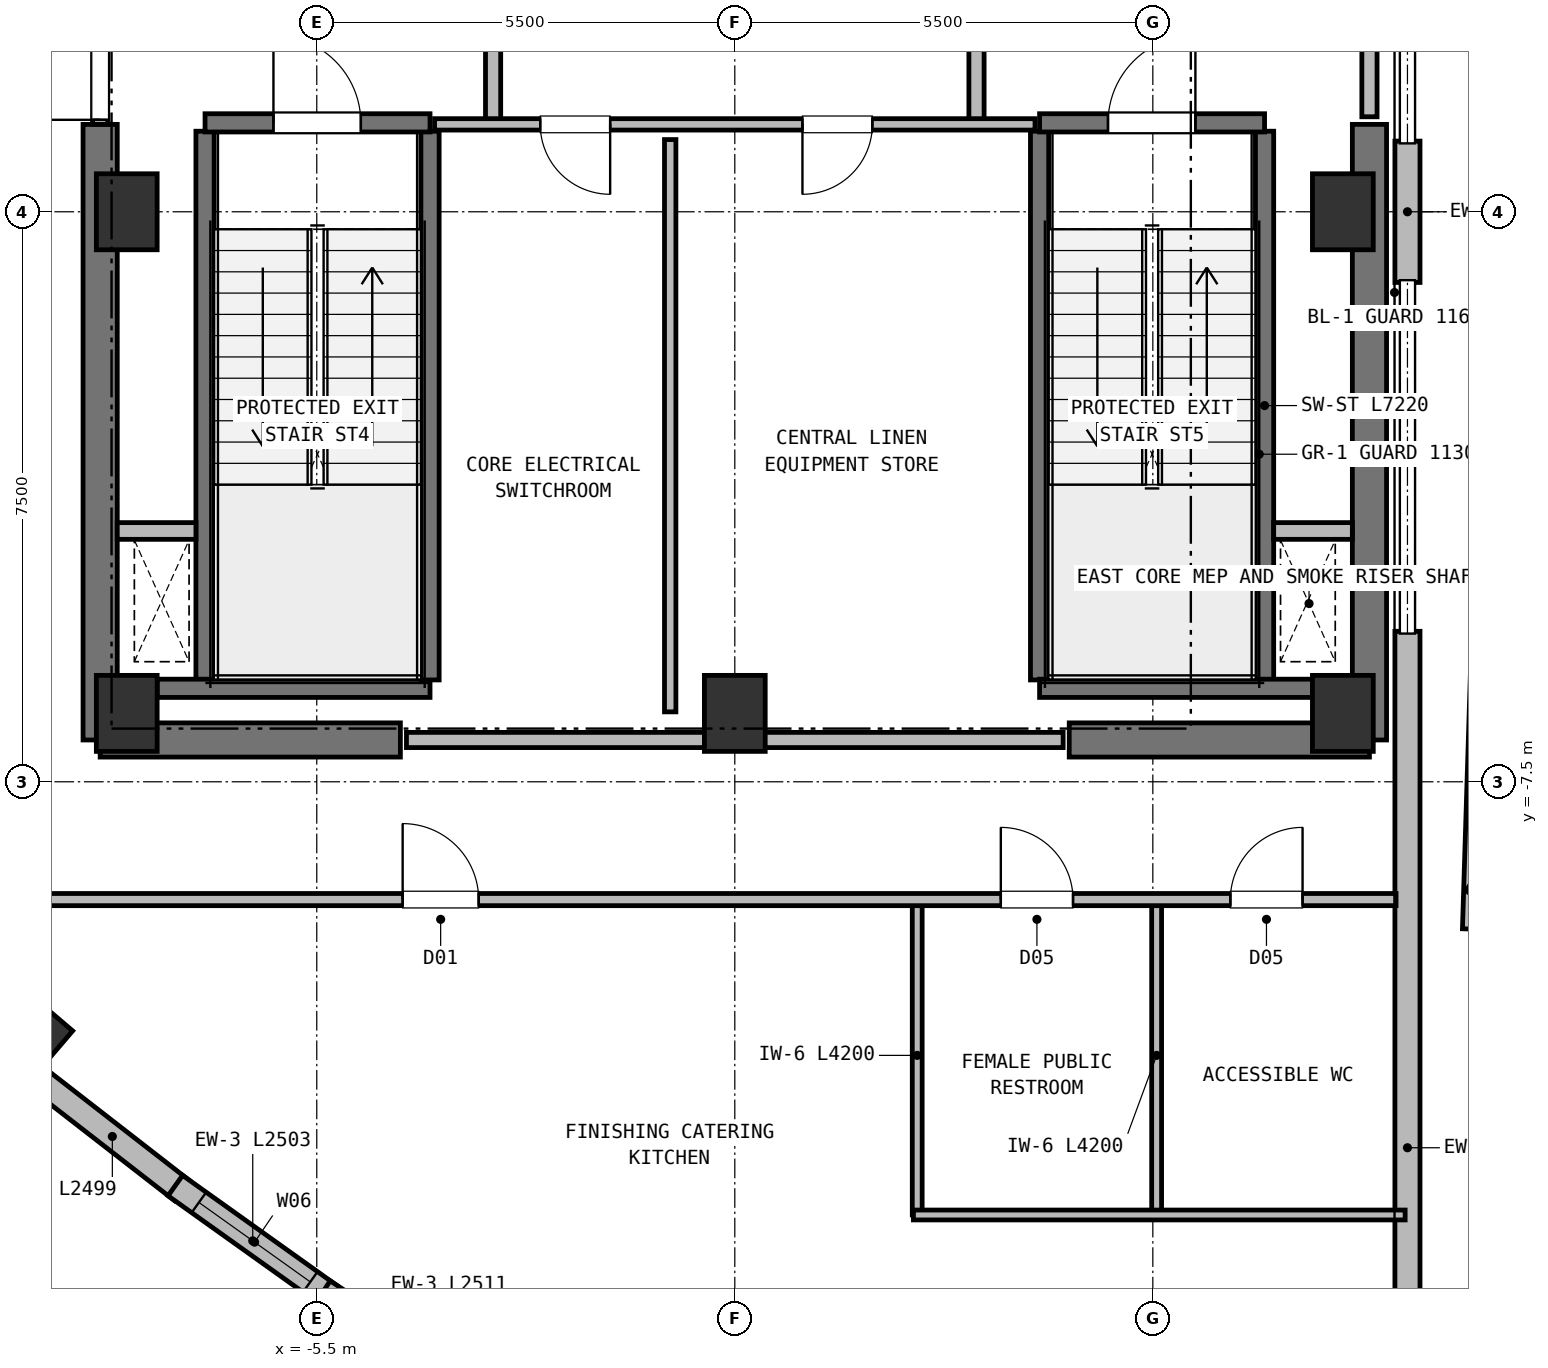
"""IFC4 building model, lengths in metres.
Left out: names, types, materials, properties, quantities, classifications, styles, units other than length and angle.
Written with IfcOpenShell. Run it as: python <this file> out.ifc"""

import sys

from ifc_helpers import new_model, si_unit, direction, frame, frame_2d, origin, origin_2d, place, context, subcontext, project, spatial, rectangle, extrude, element, fill, save


model = new_model("IFC4")
c1 = context("Model", 3, precision=1e-05, world=origin(), true_north=direction((0.0, 1.0)))
c2 = subcontext(c1, "Body", "Model", "MODEL_VIEW")
j1 = project(units=[si_unit("LENGTHUNIT", "METRE"), si_unit("PLANEANGLEUNIT", "RADIAN")], contexts=[c1])
p1 = place(None, origin())
s1 = spatial("IfcSite", under=j1, at=p1, CompositionType="ELEMENT")
p2 = place(p1, origin())
s2 = spatial("IfcBuilding", under=s1, at=p2, CompositionType="ELEMENT")
p3 = place(p2, frame((0.0, 0.0, 294.8)))
s3 = spatial("IfcBuildingStorey", under=s2, at=p3, CompositionType="ELEMENT", Elevation=294.8)
for number, where, z_axis, x_axis in (
    (1, (-8.0, -6.6, 0.0), (0.0, 0.0, 1.0), (1.0, 0.0, 0.0)),
    (2, (0.0, -6.6, 0.0), (0.0, 0.0, 1.0), (1.0, 0.0, 0.0)),
    (3, (8.0, -6.6, 0.0), (0.0, 0.0, 1.0), (1.0, 0.0, 0.0)),
    (4, (8.0, 0.0, 0.0), (0.0, 0.0, 1.0), (1.0, 0.0, 0.0)),
    (5, (-8.0, 0.0, 0.0), (0.0, 0.0, 1.0), (1.0, 0.0, 0.0)),
):
    element("IfcColumn", number, at=place(p3, frame(where, z_axis=z_axis, x_axis=x_axis)), inside=s3, PredefinedType="COLUMN", context=c2, shape_type="SweptSolid", body=[
        extrude(rectangle(XDim=0.8, YDim=1.0, at=origin_2d()), origin(), (0.0, 0.0, 1.0), 4.4),
    ])
for number, where, z_axis, x_axis in (
    (6, (-8.35, -6.95, 0.0), (0.0, 0.0, 1.0), (1.0, 0.0, 0.0)),
    (7, (4.4, -6.95, 0.0), (0.0, 0.0, 1.0), (1.0, 0.0, 0.0)),
):
    element("IfcWall", number, at=place(p3, frame(where, z_axis=z_axis, x_axis=x_axis)), inside=s3, PredefinedType="SHEAR", context=c2, shape_type="SweptSolid", body=[
        extrude(rectangle(XDim=3.95, YDim=0.45, at=frame_2d((1.975, 0.0))), origin(), (0.0, 0.0, 1.0), 4.13),
    ])
for number, where, z_axis, x_axis in (
    (8, (-8.35, -6.95, 0.0), (0.0, 0.0, 1.0), (0.0, 1.0, 0.0)),
    (9, (8.35, -6.95, 0.0), (0.0, 0.0, 1.0), (0.0, 1.0, 0.0)),
):
    element("IfcWall", number, at=place(p3, frame(where, z_axis=z_axis, x_axis=x_axis)), inside=s3, PredefinedType="SHEAR", context=c2, shape_type="SweptSolid", body=[
        extrude(rectangle(XDim=8.1, YDim=0.45, at=frame_2d((4.05, 0.0))), origin(), (0.0, 0.0, 1.0), 4.13),
    ])
p4 = place(p3, frame((-9.289, -10.876, 0.0), z_axis=(0.0, 0.0, 1.0), x_axis=(-0.7604059656, 0.64944804833, 0.0)))
e10 = element("IfcColumn", 10, at=p4, inside=s3, PredefinedType="COLUMN", context=c2, shape_type="SweptSolid", body=[
    extrude(rectangle(XDim=0.75, YDim=0.9, at=origin_2d()), origin(), (0.0, 0.0, 1.0), 4.4),
])
p5 = place(p3, frame((8.85, -5.52, 0.0), z_axis=(0.0, 0.0, 1.0), x_axis=(0.0, -1.0, 0.0)))
e11 = element("IfcWall", 11, at=p5, inside=s3, PredefinedType="SOLIDWALL", context=c2, shape_type="SweptSolid", body=[
    extrude(rectangle(XDim=13.591, YDim=0.33, at=frame_2d((6.795, 0.0))), origin(), (0.0, 0.0, 1.0), 4.13),
])
p6 = place(p3, frame((8.85, 0.93, 0.0), z_axis=(0.0, 0.0, 1.0), x_axis=(0.0, -1.0, 0.0)))
e12 = element("IfcWall", 12, at=p6, inside=s3, PredefinedType="SOLIDWALL", context=c2, shape_type="SweptSolid", body=[
    extrude(rectangle(XDim=1.86, YDim=0.33, at=frame_2d((0.93, 0.0))), origin(), (0.0, 0.0, 1.0), 4.13),
])
p7 = place(p3, frame((9.739, -9.439, 0.0), z_axis=(0.0, 0.0, 1.0), x_axis=(0.031147484759, 0.999514799387, 0.0)))
e13 = element("IfcWall", 13, at=p7, inside=s3, PredefinedType="SOLIDWALL", context=c2, shape_type="SweptSolid", body=[
    extrude(rectangle(XDim=6.114, YDim=0.33, at=frame_2d((3.057, 0.0))), origin(), (0.0, 0.0, 1.0), 3.65),
])
p8 = place(p3, frame((-7.273, -12.879, 0.0), z_axis=(0.0, 0.0, 1.0), x_axis=(-0.789841179094, 0.613311431336, 0.0)))
e14 = element("IfcWall", 14, at=p8, inside=s3, PredefinedType="SOLIDWALL", context=c2, shape_type="SweptSolid", body=[
    extrude(rectangle(XDim=2.499, YDim=0.33, at=frame_2d((1.25, 0.0))), origin(), (0.0, 0.0, 1.0), 4.13),
])
p9 = place(p3, frame((-5.323, -14.267, 0.0), z_axis=(0.0, 0.0, 1.0), x_axis=(-0.814029925436, 0.580822933857, 0.0)))
e15 = element("IfcWall", 15, at=p9, inside=s3, PredefinedType="SOLIDWALL", context=c2, shape_type="SweptSolid", body=[
    extrude(rectangle(XDim=2.503, YDim=0.33, at=frame_2d((1.251, 0.0))), origin(), (0.0, 0.0, 1.0), 4.13),
])
p10 = place(p9, frame((0.322, 0.0, 0.72)))
e16 = element("IfcOpeningElement", 16, at=p10, cuts=e15, PredefinedType="OPENING", context=c2, shape_type="SweptSolid", body=[
    extrude(rectangle(XDim=1.8, YDim=2.25, at=frame_2d((0.9, 1.125))), frame((0.0, 0.175, 0.0), z_axis=(0.0, -1.0, 0.0), x_axis=(1.0, 0.0, 0.0)), (0.0, 0.0, 1.0), 0.35),
])
p11 = place(p3, frame((-3.313, -15.58, 0.0), z_axis=(0.0, 0.0, 1.0), x_axis=(-0.836746876737, 0.547589868671, 0.0)))
e17 = element("IfcWall", 17, at=p11, inside=s3, PredefinedType="SOLIDWALL", context=c2, shape_type="SweptSolid", body=[
    extrude(rectangle(XDim=2.511, YDim=0.33, at=frame_2d((1.255, 0.0))), origin(), (0.0, 0.0, 1.0), 4.13),
])
p12 = place(p3, frame((12.352, -10.593, 0.0), z_axis=(0.0, 0.0, 1.0), x_axis=(-0.82687387766, 0.562387402459, 0.0)))
e18 = element("IfcWall", 18, at=p12, inside=s3, PredefinedType="SOLIDWALL", context=c2, shape_type="SweptSolid", body=[
    extrude(rectangle(XDim=3.193, YDim=0.33, at=frame_2d((1.596, 0.0))), origin(), (0.0, 0.0, 1.0), 3.65),
])
p13 = place(p3, frame((-6.97, -6.16, 0.0), z_axis=(0.0, 0.0, 1.0), x_axis=(0.0, 1.0, 0.0)))
e19 = element("IfcWall", 19, at=p13, inside=s3, PredefinedType="SHEAR", context=c2, shape_type="SweptSolid", body=[
    extrude(rectangle(XDim=7.22, YDim=0.24, at=frame_2d((3.61, 0.0))), origin(), (0.0, 0.0, 1.0), 4.13),
])
p14 = place(p3, frame((-7.6, -6.27, 0.0), z_axis=(0.0, 0.0, 1.0), x_axis=(1.0, 0.0, 0.0)))
e20 = element("IfcWall", 20, at=p14, inside=s3, PredefinedType="SHEAR", context=c2, shape_type="SweptSolid", body=[
    extrude(rectangle(XDim=3.59, YDim=0.24, at=frame_2d((1.795, 0.0))), origin(), (0.0, 0.0, 1.0), 4.13),
])
p15 = place(p3, frame((-4.01, -6.16, 0.0), z_axis=(0.0, 0.0, 1.0), x_axis=(0.0, 1.0, 0.0)))
e21 = element("IfcWall", 21, at=p15, inside=s3, PredefinedType="SHEAR", context=c2, shape_type="SweptSolid", body=[
    extrude(rectangle(XDim=7.22, YDim=0.24, at=frame_2d((3.61, 0.0))), origin(), (0.0, 0.0, 1.0), 4.13),
])
p16 = place(p3, frame((-6.97, 1.17, 0.0), z_axis=(0.0, 0.0, 1.0), x_axis=(1.0, 0.0, 0.0)))
e22 = element("IfcWall", 22, at=p16, inside=s3, PredefinedType="SHEAR", context=c2, shape_type="SweptSolid", body=[
    extrude(rectangle(XDim=2.96, YDim=0.24, at=frame_2d((1.48, 0.0))), origin(), (0.0, 0.0, 1.0), 4.13),
])
p17 = place(p16, frame((0.9, 0.0, 0.0)))
e23 = element("IfcOpeningElement", 23, at=p17, cuts=e22, PredefinedType="OPENING", context=c2, shape_type="SweptSolid", body=[
    extrude(rectangle(XDim=1.15, YDim=2.15, at=frame_2d((0.575, 1.075))), frame((0.0, 0.13, 0.0), z_axis=(0.0, -1.0, 0.0), x_axis=(1.0, 0.0, 0.0)), (0.0, 0.0, 1.0), 0.26),
])
for number, where, z_axis, x_axis in (
    (24, (4.01, -6.16, 0.0), (0.0, 0.0, 1.0), (0.0, 1.0, 0.0)),
    (25, (6.97, -6.16, 0.0), (0.0, 0.0, 1.0), (0.0, 1.0, 0.0)),
):
    element("IfcWall", number, at=place(p3, frame(where, z_axis=z_axis, x_axis=x_axis)), inside=s3, PredefinedType="SHEAR", context=c2, shape_type="SweptSolid", body=[
        extrude(rectangle(XDim=7.22, YDim=0.24, at=frame_2d((3.61, 0.0))), origin(), (0.0, 0.0, 1.0), 4.13),
    ])
p18 = place(p3, frame((4.01, -6.27, 0.0), z_axis=(0.0, 0.0, 1.0), x_axis=(1.0, 0.0, 0.0)))
e26 = element("IfcWall", 26, at=p18, inside=s3, PredefinedType="SHEAR", context=c2, shape_type="SweptSolid", body=[
    extrude(rectangle(XDim=3.59, YDim=0.24, at=frame_2d((1.795, 0.0))), origin(), (0.0, 0.0, 1.0), 4.13),
])
p19 = place(p3, frame((4.01, 1.17, 0.0), z_axis=(0.0, 0.0, 1.0), x_axis=(1.0, 0.0, 0.0)))
e27 = element("IfcWall", 27, at=p19, inside=s3, PredefinedType="SHEAR", context=c2, shape_type="SweptSolid", body=[
    extrude(rectangle(XDim=2.96, YDim=0.24, at=frame_2d((1.48, 0.0))), origin(), (0.0, 0.0, 1.0), 4.13),
])
p20 = place(p19, frame((0.9, 0.0, 0.0)))
e28 = element("IfcOpeningElement", 28, at=p20, cuts=e27, PredefinedType="OPENING", context=c2, shape_type="SweptSolid", body=[
    extrude(rectangle(XDim=1.15, YDim=2.15, at=frame_2d((0.575, 1.075))), frame((0.0, 0.13, 0.0), z_axis=(0.0, -1.0, 0.0), x_axis=(1.0, 0.0, 0.0)), (0.0, 0.0, 1.0), 0.26),
])
for number, where, z_axis, x_axis in (
    (29, (-8.125, -4.2, 0.0), (0.0, 0.0, 1.0), (1.0, 0.0, 0.0)),
    (30, (7.09, -4.2, 0.0), (0.0, 0.0, 1.0), (1.0, 0.0, 0.0)),
):
    element("IfcWall", number, at=place(p3, frame(where, z_axis=z_axis, x_axis=x_axis)), inside=s3, PredefinedType="PARTITIONING", context=c2, shape_type="SweptSolid", body=[
        extrude(rectangle(XDim=1.035, YDim=0.22, at=frame_2d((0.518, 0.0))), origin(), (0.0, 0.0, 1.0), 4.13),
    ])
p21 = place(p3, frame((-3.18, 1.15, 0.0), z_axis=(0.0, 0.0, 1.0), x_axis=(0.0, 1.0, 0.0)))
e31 = element("IfcWall", 31, at=p21, inside=s3, PredefinedType="PARTITIONING", context=c2, shape_type="SweptSolid", body=[
    extrude(rectangle(XDim=3.3, YDim=0.2, at=frame_2d((1.65, 0.0))), origin(), (0.0, 0.0, 1.0), 4.13),
])
p22 = place(p21, frame((1.08, 0.0, 0.0)))
e32 = element("IfcOpeningElement", 32, at=p22, cuts=e31, PredefinedType="OPENING", context=c2, shape_type="SweptSolid", body=[
    extrude(rectangle(XDim=1.15, YDim=2.15, at=frame_2d((0.575, 1.075))), frame((0.0, 0.11, 0.0), z_axis=(0.0, -1.0, 0.0), x_axis=(1.0, 0.0, 0.0)), (0.0, 0.0, 1.0), 0.22),
])
p23 = place(p3, frame((3.18, 1.15, 0.0), z_axis=(0.0, 0.0, 1.0), x_axis=(0.0, 1.0, 0.0)))
e33 = element("IfcWall", 33, at=p23, inside=s3, PredefinedType="PARTITIONING", context=c2, shape_type="SweptSolid", body=[
    extrude(rectangle(XDim=3.3, YDim=0.2, at=frame_2d((1.65, 0.0))), origin(), (0.0, 0.0, 1.0), 4.13),
])
p24 = place(p23, frame((1.08, 0.0, 0.0)))
e34 = element("IfcOpeningElement", 34, at=p24, cuts=e33, PredefinedType="OPENING", context=c2, shape_type="SweptSolid", body=[
    extrude(rectangle(XDim=1.15, YDim=2.15, at=frame_2d((0.575, 1.075))), frame((0.0, 0.11, 0.0), z_axis=(0.0, -1.0, 0.0), x_axis=(1.0, 0.0, 0.0)), (0.0, 0.0, 1.0), 0.22),
])
p25 = place(p3, frame((-8.35, 1.15, 0.0), z_axis=(0.0, 0.0, 1.0), x_axis=(0.0, 1.0, 0.0)))
e35 = element("IfcWall", 35, at=p25, inside=s3, PredefinedType="PARTITIONING", context=c2, shape_type="SweptSolid", body=[
    extrude(rectangle(XDim=5.4, YDim=0.2, at=frame_2d((2.7, 0.0))), origin(), (0.0, 0.0, 1.0), 4.13),
])
p26 = place(p25, frame((0.06, 0.0, 0.0)))
e36 = element("IfcOpeningElement", 36, at=p26, cuts=e35, PredefinedType="OPENING", context=c2, shape_type="SweptSolid", body=[
    extrude(rectangle(XDim=1.15, YDim=2.15, at=frame_2d((0.575, 1.075))), frame((0.0, 0.11, 0.0), z_axis=(0.0, -1.0, 0.0), x_axis=(1.0, 0.0, 0.0)), (0.0, 0.0, 1.0), 0.22),
])
p27 = place(p3, frame((8.35, 1.25, 0.0), z_axis=(0.0, 0.0, 1.0), x_axis=(0.0, 1.0, 0.0)))
e37 = element("IfcWall", 37, at=p27, inside=s3, PredefinedType="PARTITIONING", context=c2, shape_type="SweptSolid", body=[
    extrude(rectangle(XDim=5.3, YDim=0.2, at=frame_2d((2.65, 0.0))), origin(), (0.0, 0.0, 1.0), 4.13),
])
p28 = place(p3, frame((3.95, 1.15, 0.0), z_axis=(0.0, 0.0, 1.0), x_axis=(-1.0, 0.0, 0.0)))
e38 = element("IfcWall", 38, at=p28, inside=s3, PredefinedType="PARTITIONING", context=c2, shape_type="SweptSolid", body=[
    extrude(rectangle(XDim=7.9, YDim=0.15, at=frame_2d((3.95, 0.0))), origin(), (0.0, 0.0, 1.0), 4.13),
])
p29 = place(p28, frame((5.59, 0.0, 0.0)))
e39 = element("IfcOpeningElement", 39, at=p29, cuts=e38, PredefinedType="OPENING", context=c2, shape_type="SweptSolid", body=[
    extrude(rectangle(XDim=0.92, YDim=2.05, at=frame_2d((0.46, 1.025))), frame((0.0, 0.085, 0.0), z_axis=(0.0, -1.0, 0.0), x_axis=(1.0, 0.0, 0.0)), (0.0, 0.0, 1.0), 0.17),
])
p30 = place(p28, frame((2.14, 0.0, 0.0)))
e40 = element("IfcOpeningElement", 40, at=p30, cuts=e38, PredefinedType="OPENING", context=c2, shape_type="SweptSolid", body=[
    extrude(rectangle(XDim=0.92, YDim=2.05, at=frame_2d((0.46, 1.025))), frame((0.0, 0.085, 0.0), z_axis=(0.0, -1.0, 0.0), x_axis=(1.0, 0.0, 0.0)), (0.0, 0.0, 1.0), 0.17),
])
p31 = place(p3, frame((-4.32, -6.95, 0.0), z_axis=(0.0, 0.0, 1.0), x_axis=(1.0, 0.0, 0.0)))
e41 = element("IfcWall", 41, at=p31, inside=s3, PredefinedType="PARTITIONING", context=c2, shape_type="SweptSolid", body=[
    extrude(rectangle(XDim=8.64, YDim=0.2, at=frame_2d((4.32, 0.0))), origin(), (0.0, 0.0, 1.0), 4.13),
])
p32 = place(p3, frame((-0.85, -6.58, 0.0), z_axis=(0.0, 0.0, 1.0), x_axis=(0.0, 1.0, 0.0)))
e42 = element("IfcWall", 42, at=p32, inside=s3, PredefinedType="PARTITIONING", context=c2, shape_type="SweptSolid", body=[
    extrude(rectangle(XDim=7.53, YDim=0.15, at=frame_2d((3.765, 0.0))), origin(), (0.0, 0.0, 1.0), 4.13),
])
for number, where, z_axis, x_axis in (
    (43, (2.4, -9.0, 0.0), (0.0, 0.0, 1.0), (0.0, -1.0, 0.0)),
    (44, (5.55, -9.0, 0.0), (0.0, 0.0, 1.0), (0.0, -1.0, 0.0)),
):
    element("IfcWall", number, at=place(p3, frame(where, z_axis=z_axis, x_axis=x_axis)), inside=s3, PredefinedType="PARTITIONING", context=c2, shape_type="SweptSolid", body=[
        extrude(rectangle(XDim=4.2, YDim=0.13, at=frame_2d((2.1, 0.0))), origin(), (0.0, 0.0, 1.0), 4.13),
    ])
p33 = place(p3, frame((2.35, -13.2, 0.0), z_axis=(0.0, 0.0, 1.0), x_axis=(1.0, 0.0, 0.0)))
e45 = element("IfcWall", 45, at=p33, inside=s3, PredefinedType="PARTITIONING", context=c2, shape_type="SweptSolid", body=[
    extrude(rectangle(XDim=6.469, YDim=0.13, at=frame_2d((3.235, 0.0))), origin(), (0.0, 0.0, 1.0), 4.13),
])
p34 = place(p3, frame((-10.4, -9.05, 0.0), z_axis=(0.0, 0.0, 1.0), x_axis=(1.0, 0.0, 0.0)))
e46 = element("IfcWall", 46, at=p34, inside=s3, PredefinedType="PARTITIONING", context=c2, shape_type="SweptSolid", body=[
    extrude(rectangle(XDim=19.1, YDim=0.16, at=frame_2d((9.55, 0.0))), origin(), (0.0, 0.0, 1.0), 4.13),
])
p35 = place(p34, frame((6.03, 0.0, 0.0)))
e47 = element("IfcOpeningElement", 47, at=p35, cuts=e46, PredefinedType="OPENING", context=c2, shape_type="SweptSolid", body=[
    extrude(rectangle(XDim=1.0, YDim=2.15, at=frame_2d((0.5, 1.075))), frame((0.0, 0.09, 0.0), z_axis=(0.0, -1.0, 0.0), x_axis=(1.0, 0.0, 0.0)), (0.0, 0.0, 1.0), 0.18),
])
p36 = place(p34, frame((13.9, 0.0, 0.0)))
e48 = element("IfcOpeningElement", 48, at=p36, cuts=e46, PredefinedType="OPENING", context=c2, shape_type="SweptSolid", body=[
    extrude(rectangle(XDim=0.95, YDim=2.1, at=frame_2d((0.475, 1.05))), frame((0.0, 0.09, 0.0), z_axis=(0.0, -1.0, 0.0), x_axis=(1.0, 0.0, 0.0)), (0.0, 0.0, 1.0), 0.18),
])
p37 = place(p34, frame((16.92, 0.0, 0.0)))
e49 = element("IfcOpeningElement", 49, at=p37, cuts=e46, PredefinedType="OPENING", context=c2, shape_type="SweptSolid", body=[
    extrude(rectangle(XDim=0.95, YDim=2.1, at=frame_2d((0.475, 1.05))), frame((0.0, 0.09, 0.0), z_axis=(0.0, -1.0, 0.0), x_axis=(1.0, 0.0, 0.0)), (0.0, 0.0, 1.0), 0.18),
])
p38 = place(p10, origin())
e50 = element("IfcWindow", 50, at=p38, inside=s3, PartitioningType="SINGLE_PANEL", PredefinedType="WINDOW", context=c2, shape_type="SweptSolid", body=[
    extrude(rectangle(XDim=1.8, YDim=2.25, at=frame_2d((0.9, 1.125))), frame((0.0, 0.03, 0.0), z_axis=(0.0, -1.0, 0.0), x_axis=(1.0, 0.0, 0.0)), (0.0, 0.0, 1.0), 0.06),
])
fill(e16, e50)
p39 = place(p17, origin())
e51 = element("IfcDoor", 51, at=p39, inside=s3, OperationType="SINGLE_SWING_LEFT", PredefinedType="DOOR", context=c2, shape_type="SweptSolid", body=[
    extrude(rectangle(XDim=1.15, YDim=2.15, at=frame_2d((0.575, 1.075))), frame((0.0, 0.025, 0.0), z_axis=(0.0, -1.0, 0.0), x_axis=(1.0, 0.0, 0.0)), (0.0, 0.0, 1.0), 0.05),
])
fill(e23, e51)
p40 = place(p20, origin())
e52 = element("IfcDoor", 52, at=p40, inside=s3, OperationType="SINGLE_SWING_RIGHT", PredefinedType="DOOR", context=c2, shape_type="SweptSolid", body=[
    extrude(rectangle(XDim=1.15, YDim=2.15, at=frame_2d((0.575, 1.075))), frame((0.0, 0.025, 0.0), z_axis=(0.0, -1.0, 0.0), x_axis=(1.0, 0.0, 0.0)), (0.0, 0.0, 1.0), 0.05),
])
fill(e28, e52)
p41 = place(p26, origin())
e53 = element("IfcDoor", 53, at=p41, inside=s3, OperationType="SINGLE_SWING_LEFT", PredefinedType="DOOR", context=c2, shape_type="SweptSolid", body=[
    extrude(rectangle(XDim=1.15, YDim=2.15, at=frame_2d((0.575, 1.075))), frame((0.0, 0.025, 0.0), z_axis=(0.0, -1.0, 0.0), x_axis=(1.0, 0.0, 0.0)), (0.0, 0.0, 1.0), 0.05),
])
fill(e36, e53)
p42 = place(p29, origin())
e54 = element("IfcDoor", 54, at=p42, inside=s3, OperationType="SINGLE_SWING_LEFT", PredefinedType="DOOR", context=c2, shape_type="SweptSolid", body=[
    extrude(rectangle(XDim=0.92, YDim=2.05, at=frame_2d((0.46, 1.025))), frame((0.0, 0.025, 0.0), z_axis=(0.0, -1.0, 0.0), x_axis=(1.0, 0.0, 0.0)), (0.0, 0.0, 1.0), 0.05),
])
fill(e39, e54)
p43 = place(p30, origin())
e55 = element("IfcDoor", 55, at=p43, inside=s3, OperationType="SINGLE_SWING_RIGHT", PredefinedType="DOOR", context=c2, shape_type="SweptSolid", body=[
    extrude(rectangle(XDim=0.92, YDim=2.05, at=frame_2d((0.46, 1.025))), frame((0.0, 0.025, 0.0), z_axis=(0.0, -1.0, 0.0), x_axis=(1.0, 0.0, 0.0)), (0.0, 0.0, 1.0), 0.05),
])
fill(e40, e55)
p44 = place(p35, origin())
e56 = element("IfcDoor", 56, at=p44, inside=s3, OperationType="SINGLE_SWING_LEFT", PredefinedType="DOOR", context=c2, shape_type="SweptSolid", body=[
    extrude(rectangle(XDim=1.0, YDim=2.15, at=frame_2d((0.5, 1.075))), frame((0.0, 0.025, 0.0), z_axis=(0.0, -1.0, 0.0), x_axis=(1.0, 0.0, 0.0)), (0.0, 0.0, 1.0), 0.05),
])
fill(e47, e56)
p45 = place(p36, origin())
e57 = element("IfcDoor", 57, at=p45, inside=s3, OperationType="SINGLE_SWING_LEFT", PredefinedType="DOOR", context=c2, shape_type="SweptSolid", body=[
    extrude(rectangle(XDim=0.95, YDim=2.1, at=frame_2d((0.475, 1.05))), frame((0.0, 0.025, 0.0), z_axis=(0.0, -1.0, 0.0), x_axis=(1.0, 0.0, 0.0)), (0.0, 0.0, 1.0), 0.05),
])
fill(e48, e57)
p46 = place(p37, origin())
e58 = element("IfcDoor", 58, at=p46, inside=s3, OperationType="SINGLE_SWING_RIGHT", PredefinedType="DOOR", context=c2, shape_type="SweptSolid", body=[
    extrude(rectangle(XDim=0.95, YDim=2.1, at=frame_2d((0.475, 1.05))), frame((0.0, 0.025, 0.0), z_axis=(0.0, -1.0, 0.0), x_axis=(1.0, 0.0, 0.0)), (0.0, 0.0, 1.0), 0.05),
])
fill(e49, e58)
save(model, sys.argv[1])
